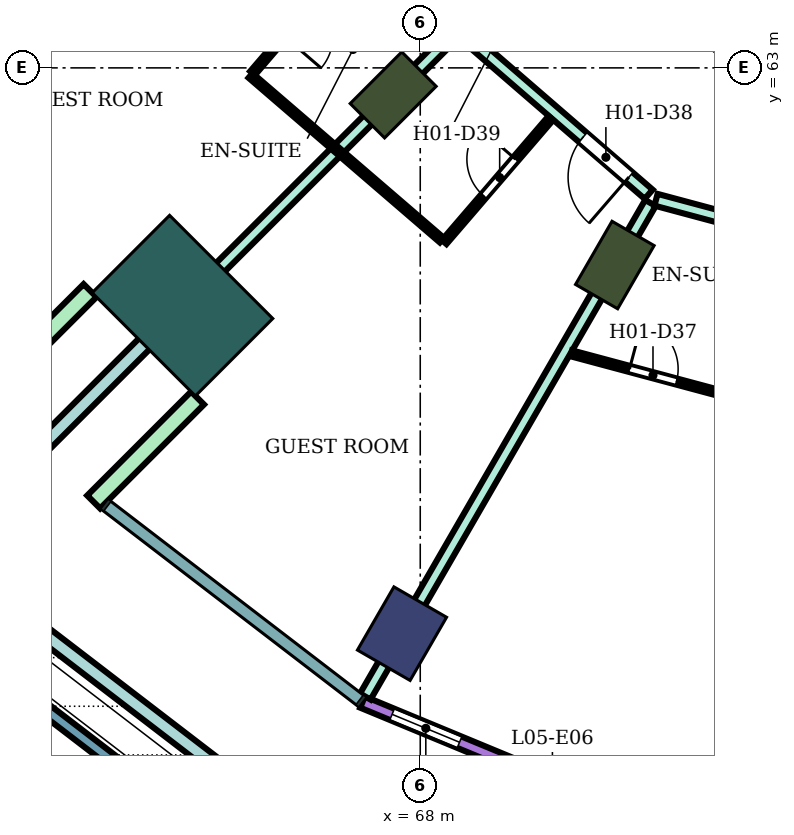
"""IFC4 building model, lengths in metres.
Left out: names, types, materials, properties, quantities, classifications, styles, units other than length and angle.
Written with IfcOpenShell. Run it as: python <this file> out.ifc"""

import sys

from ifc_helpers import new_model, si_unit, direction, frame, frame_2d, origin, origin_2d, place, context, subcontext, project, spatial, rectangle, extrude, element, fill, save


model = new_model("IFC4")
c1 = context("Model", 3, precision=1e-05, world=origin(), true_north=direction((0.0, 1.0)))
c2 = subcontext(c1, "Body", "Model", "MODEL_VIEW")
j1 = project(units=[si_unit("LENGTHUNIT", "METRE"), si_unit("PLANEANGLEUNIT", "RADIAN")], contexts=[c1])
p1 = place(None, origin())
s1 = spatial("IfcSite", under=j1, at=p1, CompositionType="ELEMENT")
p2 = place(p1, origin())
s2 = spatial("IfcBuilding", under=s1, at=p2, CompositionType="ELEMENT")
p3 = place(p2, frame((0.0, 0.0, 28.8)))
s3 = spatial("IfcBuildingStorey", under=s2, at=p3, CompositionType="ELEMENT", Elevation=28.8)
p4 = place(p3, frame((67.7, 53.696, 0.0), z_axis=(0.0, 0.0, 1.0), x_axis=(-0.5, -0.866025403784, 0.0)))
e1 = element("IfcColumn", 1, at=p4, inside=s3, PredefinedType="COLUMN", context=c2, shape_type="SweptSolid", body=[
    extrude(rectangle(XDim=1.2, YDim=1.0, at=origin_2d()), origin(), (0.0, 0.0, 1.0), 3.8),
])
for number, where, z_axis, x_axis in (
    (2, (67.555, 62.555, 0.0), (0.0, 0.0, 1.0), (-0.707, -0.707, 0.0)),
    (3, (71.2, 59.758, 0.0), (0.0, 0.0, 1.0), (-0.5, -0.866, 0.0)),
):
    element("IfcColumn", number, at=place(p3, frame(where, z_axis=z_axis, x_axis=x_axis)), inside=s3, PredefinedType="COLUMN", context=c2, shape_type="SweptSolid", body=[
        extrude(rectangle(XDim=1.2, YDim=0.8, at=origin_2d()), origin(), (0.0, 0.0, 1.0), 3.8),
    ])
p5 = place(p3, frame((64.09, 59.09, 0.0), z_axis=(0.0, 0.0, 1.0), x_axis=(-0.707106781187, -0.707106781187, 0.0)))
e4 = element("IfcColumn", 4, at=p5, inside=s3, PredefinedType="COLUMN", context=c2, shape_type="SweptSolid", body=[
    extrude(rectangle(XDim=1.8, YDim=2.4, at=origin_2d()), origin(), (0.0, 0.0, 1.0), 3.8),
])
p6 = place(p3, frame((67.051, 52.571, 0.0), z_axis=(0.0, 0.0, 1.0), x_axis=(0.923875115043, -0.382694096902, 0.0)))
e5 = element("IfcWall", 5, at=p6, inside=s3, PredefinedType="NOTDEFINED", context=c2, shape_type="SweptSolid", body=[
    extrude(rectangle(XDim=6.761, YDim=0.2, at=frame_2d((3.38, 0.0))), origin(), (0.0, 0.0, 1.0), 3.8),
])
p7 = place(p6, frame((0.527, 0.0, 0.9)))
e6 = element("IfcOpeningElement", 6, at=p7, cuts=e5, PredefinedType="OPENING", context=c2, shape_type="SweptSolid", body=[
    extrude(rectangle(XDim=1.2, YDim=2.4, at=frame_2d((0.6, 1.2))), frame((0.0, 0.11, 0.0), z_axis=(0.0, -1.0, 0.0), x_axis=(1.0, 0.0, 0.0)), (0.0, 0.0, 1.0), 0.22),
])
p8 = place(p6, frame((2.48, 0.0, 0.0)))
e7 = element("IfcOpeningElement", 7, at=p8, cuts=e5, PredefinedType="OPENING", context=c2, shape_type="SweptSolid", body=[
    extrude(rectangle(XDim=1.8, YDim=2.4, at=frame_2d((0.9, 1.2))), frame((0.0, 0.11, 0.0), z_axis=(0.0, -1.0, 0.0), x_axis=(1.0, 0.0, 0.0)), (0.0, 0.0, 1.0), 0.22),
])
p9 = place(p6, frame((5.034, 0.0, 0.9)))
e8 = element("IfcOpeningElement", 8, at=p9, cuts=e5, PredefinedType="OPENING", context=c2, shape_type="SweptSolid", body=[
    extrude(rectangle(XDim=1.2, YDim=2.4, at=frame_2d((0.6, 1.2))), frame((0.0, 0.11, 0.0), z_axis=(0.0, -1.0, 0.0), x_axis=(1.0, 0.0, 0.0)), (0.0, 0.0, 1.0), 0.22),
])
for number, where, z_axis, x_axis in (
    (9, (62.57, 59.338, 0.0), (0.0, 0.0, 1.0), (-0.707, -0.707, 0.0)),
    (10, (64.338, 57.57, 0.0), (0.0, 0.0, 1.0), (-0.707, -0.707, 0.0)),
):
    element("IfcWall", number, at=place(p3, frame(where, z_axis=z_axis, x_axis=x_axis)), inside=s3, PredefinedType="NOTDEFINED", context=c2, shape_type="SweptSolid", body=[
        extrude(rectangle(XDim=2.416, YDim=0.3, at=frame_2d((1.208, 0.0))), origin(), (0.0, 0.0, 1.0), 3.8),
    ])
p10 = place(p3, frame((65.391, 49.722, 0.0), z_axis=(0.0, 0.0, 1.0), x_axis=(-0.793367808682, 0.608742572971, 0.0)))
e11 = element("IfcWall", 11, at=p10, inside=s3, PredefinedType="PARAPET", context=c2, shape_type="SweptSolid", body=[
    extrude(rectangle(XDim=7.596, YDim=0.2, at=frame_2d((3.798, 0.0))), origin(), (0.0, 0.0, 1.0), 1.1),
])
p11 = place(p3, frame((65.877, 50.572, 0.0), z_axis=(0.0, 0.0, 1.0), x_axis=(-0.793355967101, 0.608758005668, 0.0)))
e12 = element("IfcWall", 12, at=p11, inside=s3, PredefinedType="USERDEFINED", context=c2, shape_type="SweptSolid", body=[
    extrude(rectangle(XDim=6.232, YDim=0.25, at=frame_2d((3.116, 0.0))), origin(), (0.0, 0.0, 1.0), 0.6),
])
p12 = place(p3, frame((60.124, 55.124, 0.0), z_axis=(0.0, 0.0, 1.0), x_axis=(0.707106781187, 0.707106781187, 0.0)))
e13 = element("IfcWall", 13, at=p12, inside=s3, PredefinedType="USERDEFINED", context=c2, shape_type="SweptSolid", body=[
    extrude(rectangle(XDim=4.909, YDim=0.25, at=frame_2d((2.455, 0.0))), origin(), (0.0, 0.0, 1.0), 0.6),
])
p13 = place(p3, frame((63.592, 58.599, 0.0), z_axis=(0.0, 0.0, 1.0), x_axis=(0.707228748718, 0.706984792613, 0.0)))
e14 = element("IfcWall", 14, at=p13, inside=s3, PredefinedType="PARTITIONING", context=c2, shape_type="SweptSolid", body=[
    extrude(rectangle(XDim=7.005, YDim=0.2, at=frame_2d((3.503, 0.0))), origin(), (0.0, 0.0, 1.0), 3.35),
])
p14 = place(p3, frame((67.078, 64.968, 0.0), z_axis=(0.0, 0.0, 1.0), x_axis=(0.756371089567, -0.654142778656, 0.0)))
e15 = element("IfcWall", 15, at=p14, inside=s3, PredefinedType="PARTITIONING", context=c2, shape_type="SweptSolid", body=[
    extrude(rectangle(XDim=6.185, YDim=0.2, at=frame_2d((3.093, 0.0))), origin(), (0.0, 0.0, 1.0), 3.35),
])
p15 = place(p14, frame((4.755, 0.0, 0.0)))
e16 = element("IfcOpeningElement", 16, at=p15, cuts=e15, PredefinedType="OPENING", context=c2, shape_type="SweptSolid", body=[
    extrude(rectangle(XDim=1.0, YDim=2.1, at=frame_2d((0.5, 1.05))), frame((0.0, 0.11, 0.0), z_axis=(0.0, -1.0, 0.0), x_axis=(1.0, 0.0, 0.0)), (0.0, 0.0, 1.0), 0.22),
])
p16 = place(p3, frame((67.096, 52.662, 0.0), z_axis=(0.0, 0.0, 1.0), x_axis=(0.500242450002, 0.865885379953, 0.0)))
e17 = element("IfcWall", 17, at=p16, inside=s3, PredefinedType="PARTITIONING", context=c2, shape_type="SweptSolid", body=[
    extrude(rectangle(XDim=9.374, YDim=0.2, at=frame_2d((4.687, 0.0))), origin(), (0.0, 0.0, 1.0), 3.35),
])
p17 = place(p3, frame((69.158, 66.6, 0.0), z_axis=(0.0, 0.0, 1.0), x_axis=(0.757976058094, -0.652282373943, 0.0)))
e18 = element("IfcWall", 18, at=p17, inside=s3, PredefinedType="PARTITIONING", context=c2, shape_type="SweptSolid", body=[
    extrude(rectangle(XDim=5.16, YDim=0.2, at=frame_2d((2.58, 0.0))), origin(), (0.0, 0.0, 1.0), 3.35),
])
p18 = place(p17, frame((1.6, 0.0, 0.0)))
e19 = element("IfcOpeningElement", 19, at=p18, cuts=e18, PredefinedType="OPENING", context=c2, shape_type="SweptSolid", body=[
    extrude(rectangle(XDim=1.0, YDim=2.1, at=frame_2d((0.5, 1.05))), frame((0.0, 0.11, 0.0), z_axis=(0.0, -1.0, 0.0), x_axis=(1.0, 0.0, 0.0)), (0.0, 0.0, 1.0), 0.22),
])
p19 = place(p3, frame((71.877, 60.831, 0.0), z_axis=(0.0, 0.0, 1.0), x_axis=(0.965852509869, -0.259092510851, 0.0)))
e20 = element("IfcWall", 20, at=p19, inside=s3, PredefinedType="PARTITIONING", context=c2, shape_type="SweptSolid", body=[
    extrude(rectangle(XDim=8.32, YDim=0.2, at=frame_2d((4.16, 0.0))), origin(), (0.0, 0.0, 1.0), 3.35),
])
p20 = place(p19, frame((6.86, 0.0, 0.0)))
e21 = element("IfcOpeningElement", 21, at=p20, cuts=e20, PredefinedType="OPENING", context=c2, shape_type="SweptSolid", body=[
    extrude(rectangle(XDim=1.0, YDim=2.1, at=frame_2d((0.5, 1.05))), frame((0.0, 0.11, 0.0), z_axis=(0.0, -1.0, 0.0), x_axis=(1.0, 0.0, 0.0)), (0.0, 0.0, 1.0), 0.22),
])
p21 = place(p3, frame((57.659, 62.101, 0.0), z_axis=(0.0, 0.0, 1.0), x_axis=(0.86602264145, 0.500004784474, 0.0)))
e22 = element("IfcWall", 22, at=p21, inside=s3, PredefinedType="PARTITIONING", context=c2, shape_type="SweptSolid", body=[
    extrude(rectangle(XDim=8.708, YDim=0.1, at=frame_2d((4.354, 0.0))), origin(), (0.0, 0.0, 1.0), 3.35),
])
p22 = place(p21, frame((3.929, 0.0, 0.0)))
e23 = element("IfcOpeningElement", 23, at=p22, cuts=e22, PredefinedType="OPENING", context=c2, shape_type="SweptSolid", body=[
    extrude(rectangle(XDim=0.9, YDim=2.1, at=frame_2d((0.45, 1.05))), frame((0.0, 0.06, 0.0), z_axis=(0.0, -1.0, 0.0), x_axis=(1.0, 0.0, 0.0)), (0.0, 0.0, 1.0), 0.12),
])
p23 = place(p3, frame((65.242, 62.912, 0.0), z_axis=(0.0, 0.0, 1.0), x_axis=(0.652069888227, 0.758158862553, 0.0)))
e24 = element("IfcWall", 24, at=p23, inside=s3, PredefinedType="PARTITIONING", context=c2, shape_type="SweptSolid", body=[
    extrude(rectangle(XDim=2.75, YDim=0.1, at=frame_2d((1.375, 0.0))), origin(), (0.0, 0.0, 1.0), 3.35),
])
p24 = place(p23, frame((0.8, 0.0, 0.0)))
e25 = element("IfcOpeningElement", 25, at=p24, cuts=e24, PredefinedType="OPENING", context=c2, shape_type="SweptSolid", body=[
    extrude(rectangle(XDim=0.8, YDim=2.1, at=frame_2d((0.4, 1.05))), frame((0.0, 0.06, 0.0), z_axis=(0.0, -1.0, 0.0), x_axis=(1.0, 0.0, 0.0)), (0.0, 0.0, 1.0), 0.12),
])
p25 = place(p3, frame((65.209, 62.875, 0.0), z_axis=(0.0, 0.0, 1.0), x_axis=(0.757930378138, -0.652335451969, 0.0)))
e26 = element("IfcWall", 26, at=p25, inside=s3, PredefinedType="PARTITIONING", context=c2, shape_type="SweptSolid", body=[
    extrude(rectangle(XDim=4.15, YDim=0.1, at=frame_2d((2.075, 0.0))), origin(), (0.0, 0.0, 1.0), 3.35),
])
p26 = place(p3, frame((68.393, 60.135, 0.0), z_axis=(0.0, 0.0, 1.0), x_axis=(0.652061182569, 0.758166349944, 0.0)))
e27 = element("IfcWall", 27, at=p26, inside=s3, PredefinedType="PARTITIONING", context=c2, shape_type="SweptSolid", body=[
    extrude(rectangle(XDim=2.69, YDim=0.1, at=frame_2d((1.345, 0.0))), origin(), (0.0, 0.0, 1.0), 3.35),
])
p27 = place(p26, frame((1.0, 0.0, 0.0)))
e28 = element("IfcOpeningElement", 28, at=p27, cuts=e27, PredefinedType="OPENING", context=c2, shape_type="SweptSolid", body=[
    extrude(rectangle(XDim=0.8, YDim=2.1, at=frame_2d((0.4, 1.05))), frame((0.0, 0.06, 0.0), z_axis=(0.0, -1.0, 0.0), x_axis=(1.0, 0.0, 0.0)), (0.0, 0.0, 1.0), 0.12),
])
p28 = place(p3, frame((70.484, 58.305, 0.0), z_axis=(0.0, 0.0, 1.0), x_axis=(0.965904703781, -0.258897862512, 0.0)))
e29 = element("IfcWall", 29, at=p28, inside=s3, PredefinedType="PARTITIONING", context=c2, shape_type="SweptSolid", body=[
    extrude(rectangle(XDim=2.841, YDim=0.1, at=frame_2d((1.421, 0.0))), origin(), (0.0, 0.0, 1.0), 3.35),
])
p29 = place(p28, frame((0.99, 0.0, 0.0)))
e30 = element("IfcOpeningElement", 30, at=p29, cuts=e29, PredefinedType="OPENING", context=c2, shape_type="SweptSolid", body=[
    extrude(rectangle(XDim=0.8, YDim=2.1, at=frame_2d((0.4, 1.05))), frame((0.0, 0.06, 0.0), z_axis=(0.0, -1.0, 0.0), x_axis=(1.0, 0.0, 0.0)), (0.0, 0.0, 1.0), 0.12),
])
p30 = place(p7, origin())
e31 = element("IfcWindow", 31, at=p30, inside=s3, PartitioningType="SINGLE_PANEL", PredefinedType="WINDOW", context=c2, shape_type="SweptSolid", body=[
    extrude(rectangle(XDim=1.2, YDim=2.4, at=frame_2d((0.6, 1.2))), frame((0.0, 0.03, 0.0), z_axis=(0.0, -1.0, 0.0), x_axis=(1.0, 0.0, 0.0)), (0.0, 0.0, 1.0), 0.06),
])
fill(e6, e31)
p31 = place(p29, origin())
e32 = element("IfcDoor", 32, at=p31, inside=s3, OperationType="SINGLE_SWING_LEFT", PredefinedType="DOOR", context=c2, shape_type="SweptSolid", body=[
    extrude(rectangle(XDim=0.8, YDim=2.1, at=frame_2d((0.4, 1.05))), frame((0.0, 0.025, 0.0), z_axis=(0.0, -1.0, 0.0), x_axis=(1.0, 0.0, 0.0)), (0.0, 0.0, 1.0), 0.05),
])
fill(e30, e32)
p32 = place(p15, frame((1.0, 0.0, 0.0), z_axis=(0.0, 0.0, 1.0), x_axis=(-1.0, 0.0, 0.0)))
e33 = element("IfcDoor", 33, at=p32, inside=s3, OperationType="SINGLE_SWING_LEFT", PredefinedType="DOOR", context=c2, shape_type="SweptSolid", body=[
    extrude(rectangle(XDim=1.0, YDim=2.1, at=frame_2d((0.5, 1.05))), frame((0.0, 0.025, 0.0), z_axis=(0.0, -1.0, 0.0), x_axis=(1.0, 0.0, 0.0)), (0.0, 0.0, 1.0), 0.05),
])
fill(e16, e33)
p33 = place(p27, origin())
e34 = element("IfcDoor", 34, at=p33, inside=s3, OperationType="SINGLE_SWING_RIGHT", PredefinedType="DOOR", context=c2, shape_type="SweptSolid", body=[
    extrude(rectangle(XDim=0.8, YDim=2.1, at=frame_2d((0.4, 1.05))), frame((0.0, 0.025, 0.0), z_axis=(0.0, -1.0, 0.0), x_axis=(1.0, 0.0, 0.0)), (0.0, 0.0, 1.0), 0.05),
])
fill(e28, e34)
save(model, sys.argv[1])
